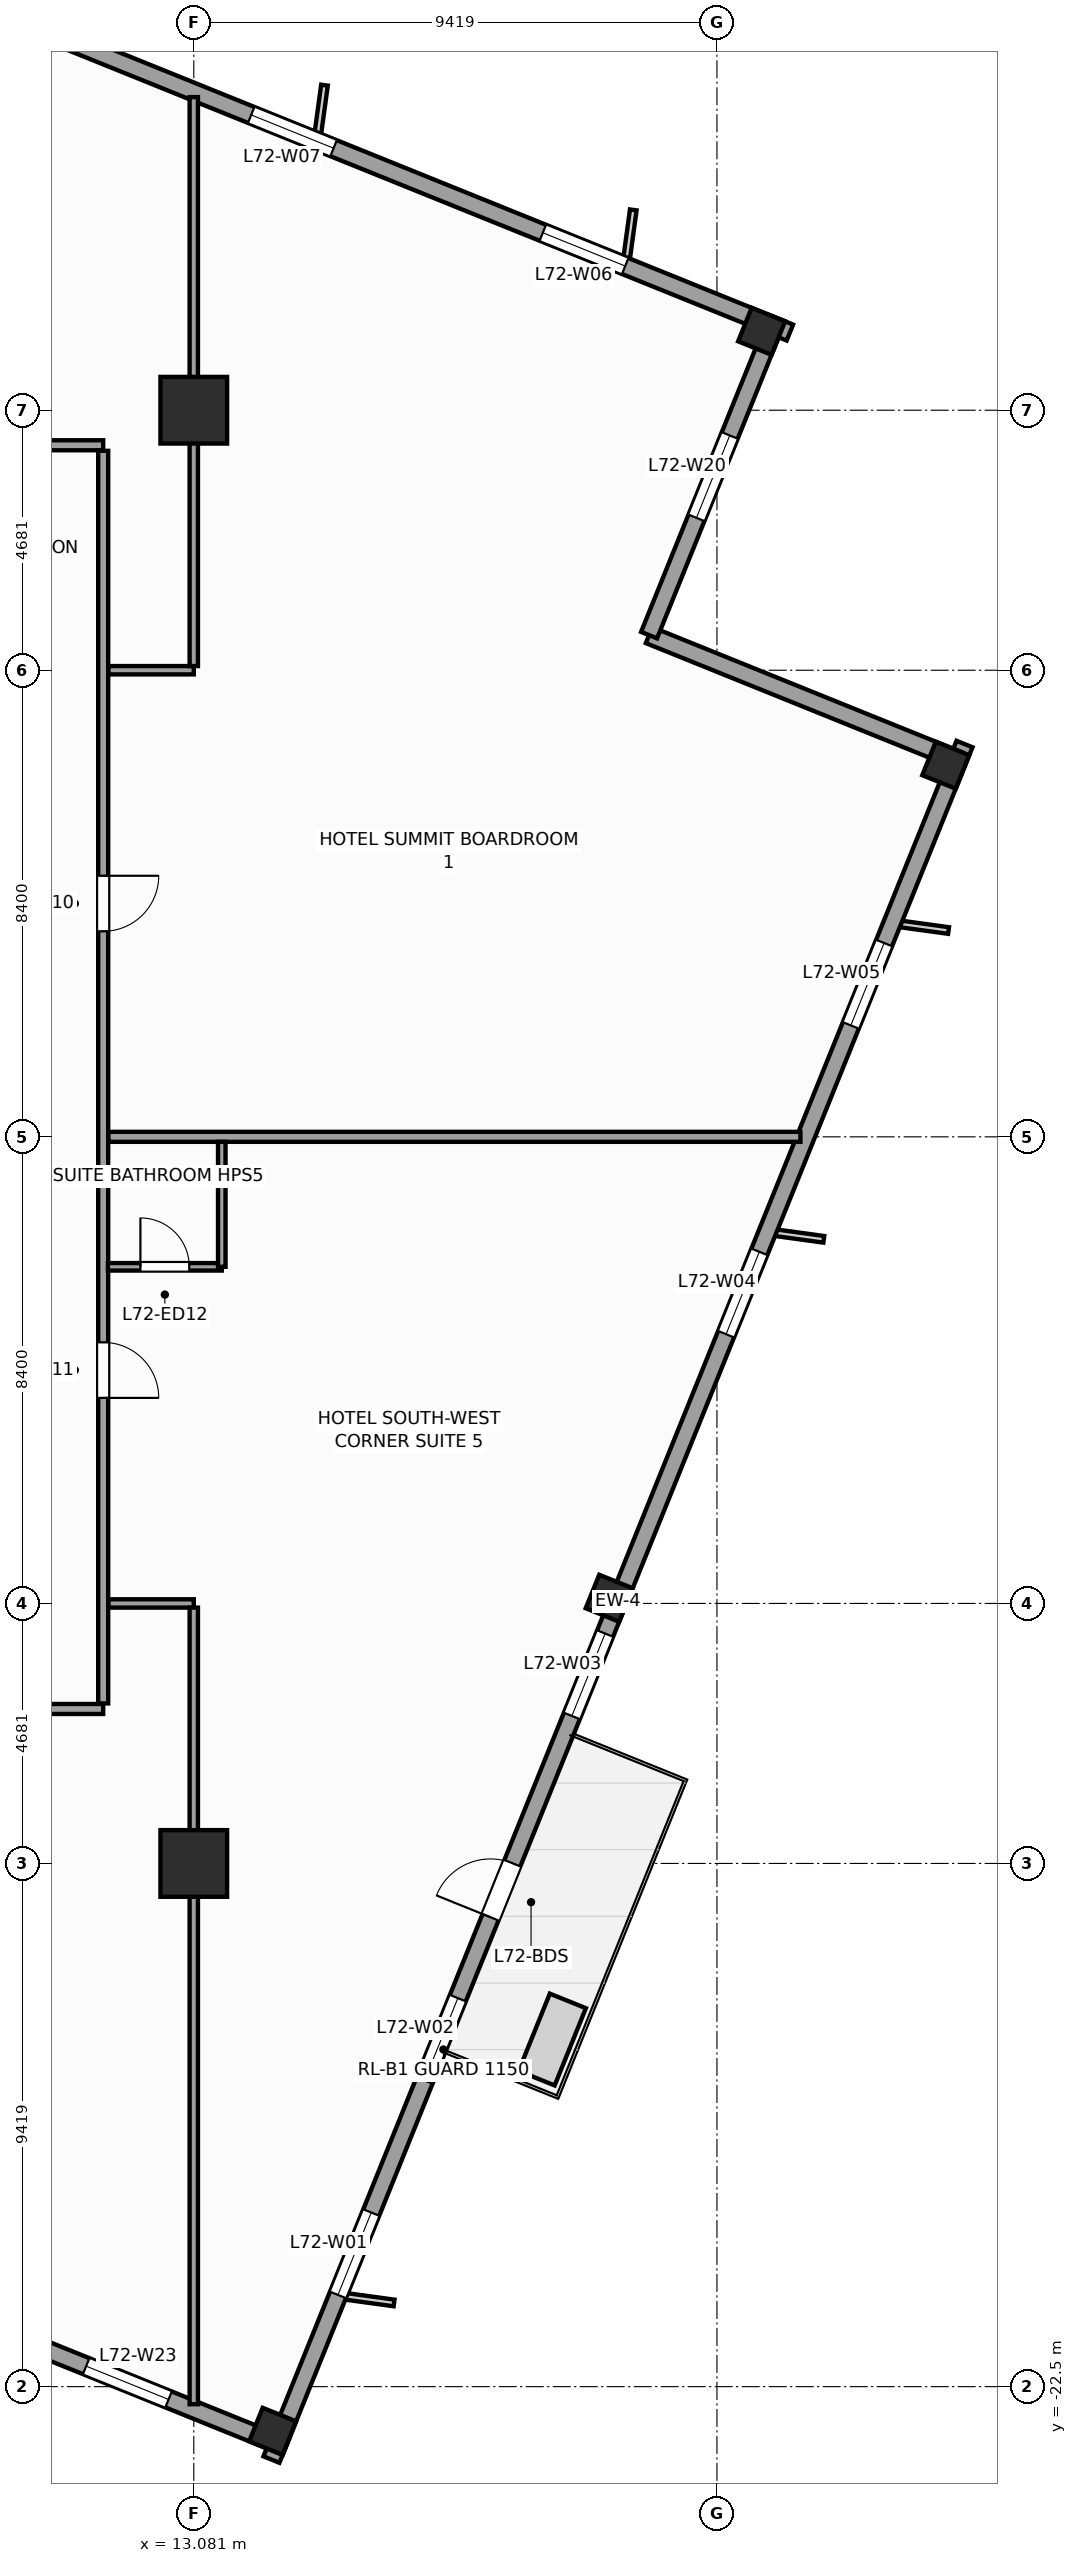
"""IFC4 building model, lengths in metres.
Left out: names, types, materials, properties, quantities, classifications, styles, units other than length and angle.
Written with IfcOpenShell. Run it as: python <this file> out.ifc"""

import sys

from ifc_helpers import new_model, si_unit, direction, frame, frame_2d, origin, origin_2d, place, context, subcontext, project, spatial, rectangle, extrude, source, transform, mapped, element, fill, save


model = new_model("IFC4")
c1 = context("Model", 3, precision=1e-05, world=origin(), true_north=direction((0.0, 1.0)))
c2 = subcontext(c1, "Body", "Model", "MODEL_VIEW")
j1 = project(units=[si_unit("LENGTHUNIT", "METRE"), si_unit("PLANEANGLEUNIT", "RADIAN")], contexts=[c1])
p1 = place(None, origin())
s1 = spatial("IfcSite", under=j1, at=p1, CompositionType="ELEMENT")
p2 = place(p1, origin())
s2 = spatial("IfcBuilding", under=s1, at=p2, CompositionType="ELEMENT")
p3 = place(p2, frame((0.0, 0.0, 294.0)))
s3 = spatial("IfcBuildingStorey", under=s2, at=p3, CompositionType="ELEMENT", Elevation=294.0)
m1 = source(origin(), c2, "Body", "SweptSolid", [
    extrude(rectangle(XDim=1.2, YDim=1.2, at=origin_2d()), origin(), (0.0, 0.0, 1.0), 3.6),
])
for number, where, z_axis, x_axis in (
    (1, (13.081, -13.081, 0.0), (0.0, 0.0, 1.0), (1.0, 0.0, 0.0)),
    (2, (13.081, 13.081, 0.0), (0.0, 0.0, 1.0), (1.0, 0.0, 0.0)),
):
    element("IfcColumn", number, at=place(p3, frame(where, z_axis=z_axis, x_axis=x_axis)), inside=s3, PredefinedType="COLUMN", context=c2, shape_type="MappedRepresentation", body=[
        mapped(m1, transform((0.0, 0.0, 0.0), scale=1.0)),
    ])
m2 = source(origin(), c2, "Body", "SweptSolid", [
    extrude(rectangle(XDim=0.65, YDim=0.65, at=origin_2d()), origin(), (0.0, 0.0, 1.0), 3.6),
])
for number, where, z_axis, x_axis in (
    (3, (14.501, -23.304, 0.0), (0.0, 0.0, 1.0), (0.375, 0.927, 0.0)),
    (4, (20.56, -8.307, 0.0), (0.0, 0.0, 1.0), (0.375, 0.927, 0.0)),
    (5, (26.62, 6.69, 0.0), (0.0, 0.0, 1.0), (0.375, 0.927, 0.0)),
    (6, (23.304, 14.501, 0.0), (0.0, 0.0, 1.0), (0.375, 0.927, 0.0)),
):
    element("IfcColumn", number, at=place(p3, frame(where, z_axis=z_axis, x_axis=x_axis)), inside=s3, PredefinedType="COLUMN", context=c2, shape_type="MappedRepresentation", body=[
        mapped(m2, transform((0.0, 0.0, 0.0), scale=1.0)),
    ])
p4 = place(p3, frame((14.479, -23.813, 0.0), z_axis=(0.0, 0.0, 1.0), x_axis=(0.374609557019, 0.927182657188, 0.0)))
e7 = element("IfcWall", 7, at=p4, inside=s3, PredefinedType="STANDARD", context=c2, shape_type="SweptSolid", body=[
    extrude(rectangle(XDim=33.31, YDim=0.31, at=frame_2d((16.655, 0.0))), origin(), (0.0, 0.0, 1.0), 2.75),
])
p5 = place(p4, frame((10.53, 0.0, 0.0)))
e8 = element("IfcOpeningElement", 8, at=p5, cuts=e7, PredefinedType="OPENING", context=c2, shape_type="SweptSolid", body=[
    extrude(rectangle(XDim=1.05, YDim=2.25, at=frame_2d((0.525, 1.125))), frame((0.0, 0.165, 0.0), z_axis=(0.0, -1.0, 0.0), x_axis=(1.0, 0.0, 0.0)), (0.0, 0.0, 1.0), 0.33),
])
p6 = place(p4, frame((3.197, 0.0, 0.47)))
e9 = element("IfcOpeningElement", 9, at=p6, cuts=e7, PredefinedType="OPENING", context=c2, shape_type="SweptSolid", body=[
    extrude(rectangle(XDim=1.6, YDim=2.1, at=frame_2d((0.8, 1.05))), frame((0.0, 0.165, 0.0), z_axis=(0.0, -1.0, 0.0), x_axis=(1.0, 0.0, 0.0)), (0.0, 0.0, 1.0), 0.33),
])
p7 = place(p4, frame((7.36, 0.0, 0.47)))
e10 = element("IfcOpeningElement", 10, at=p7, cuts=e7, PredefinedType="OPENING", context=c2, shape_type="SweptSolid", body=[
    extrude(rectangle(XDim=1.6, YDim=2.1, at=frame_2d((0.8, 1.05))), frame((0.0, 0.165, 0.0), z_axis=(0.0, -1.0, 0.0), x_axis=(1.0, 0.0, 0.0)), (0.0, 0.0, 1.0), 0.33),
])
p8 = place(p4, frame((14.439, 0.0, 0.47)))
e11 = element("IfcOpeningElement", 11, at=p8, cuts=e7, PredefinedType="OPENING", context=c2, shape_type="SweptSolid", body=[
    extrude(rectangle(XDim=1.6, YDim=2.1, at=frame_2d((0.8, 1.05))), frame((0.0, 0.165, 0.0), z_axis=(0.0, -1.0, 0.0), x_axis=(1.0, 0.0, 0.0)), (0.0, 0.0, 1.0), 0.33),
])
p9 = place(p4, frame((21.851, 0.0, 0.47)))
e12 = element("IfcOpeningElement", 12, at=p9, cuts=e7, PredefinedType="OPENING", context=c2, shape_type="SweptSolid", body=[
    extrude(rectangle(XDim=1.6, YDim=2.1, at=frame_2d((0.8, 1.05))), frame((0.0, 0.165, 0.0), z_axis=(0.0, -1.0, 0.0), x_axis=(1.0, 0.0, 0.0)), (0.0, 0.0, 1.0), 0.33),
])
p10 = place(p4, frame((27.847, 0.0, 0.47)))
e13 = element("IfcOpeningElement", 13, at=p10, cuts=e7, PredefinedType="OPENING", context=c2, shape_type="SweptSolid", body=[
    extrude(rectangle(XDim=1.6, YDim=2.1, at=frame_2d((0.8, 1.05))), frame((0.0, 0.165, 0.0), z_axis=(0.0, -1.0, 0.0), x_axis=(1.0, 0.0, 0.0)), (0.0, 0.0, 1.0), 0.33),
])
p11 = place(p3, frame((26.841, 6.784, 0.0), z_axis=(0.0, 0.0, 1.0), x_axis=(-0.927171722085, 0.374636620962, 0.0)))
e14 = element("IfcWall", 14, at=p11, inside=s3, PredefinedType="STANDARD", context=c2, shape_type="SweptSolid", body=[
    extrude(rectangle(XDim=6.0, YDim=0.31, at=frame_2d((3.0, 0.0))), origin(), (0.0, 0.0, 1.0), 2.65),
])
p12 = place(p3, frame((21.278, 9.032, 0.0), z_axis=(0.0, 0.0, 1.0), x_axis=(0.374602739196, 0.927185411764, 0.0)))
e15 = element("IfcWall", 15, at=p12, inside=s3, PredefinedType="STANDARD", context=c2, shape_type="SweptSolid", body=[
    extrude(rectangle(XDim=6.155, YDim=0.31, at=frame_2d((3.078, 0.0))), origin(), (0.0, 0.0, 1.0), 3.35),
])
p13 = place(p12, frame((2.278, 0.0, 0.47)))
e16 = element("IfcOpeningElement", 16, at=p13, cuts=e15, PredefinedType="OPENING", context=c2, shape_type="SweptSolid", body=[
    extrude(rectangle(XDim=1.6, YDim=2.1, at=frame_2d((0.8, 1.05))), frame((0.0, 0.165, 0.0), z_axis=(0.0, -1.0, 0.0), x_axis=(1.0, 0.0, 0.0)), (0.0, 0.0, 1.0), 0.33),
])
p14 = place(p3, frame((23.813, 14.479, 0.0), z_axis=(0.0, 0.0, 1.0), x_axis=(-0.927182657188, 0.374609557019, 0.0)))
e17 = element("IfcWall", 17, at=p14, inside=s3, PredefinedType="STANDARD", context=c2, shape_type="SweptSolid", body=[
    extrude(rectangle(XDim=33.31, YDim=0.31, at=frame_2d((16.655, 0.0))), origin(), (0.0, 0.0, 1.0), 2.75),
])
p15 = place(p14, frame((3.197, 0.0, 0.47)))
e18 = element("IfcOpeningElement", 18, at=p15, cuts=e17, PredefinedType="OPENING", context=c2, shape_type="SweptSolid", body=[
    extrude(rectangle(XDim=1.6, YDim=2.1, at=frame_2d((0.8, 1.05))), frame((0.0, 0.165, 0.0), z_axis=(0.0, -1.0, 0.0), x_axis=(1.0, 0.0, 0.0)), (0.0, 0.0, 1.0), 0.33),
])
p16 = place(p14, frame((8.86, 0.0, 0.47)))
e19 = element("IfcOpeningElement", 19, at=p16, cuts=e17, PredefinedType="OPENING", context=c2, shape_type="SweptSolid", body=[
    extrude(rectangle(XDim=1.6, YDim=2.1, at=frame_2d((0.8, 1.05))), frame((0.0, 0.165, 0.0), z_axis=(0.0, -1.0, 0.0), x_axis=(1.0, 0.0, 0.0)), (0.0, 0.0, 1.0), 0.33),
])
p17 = place(p14, frame((14.439, 0.0, 0.47)))
e20 = element("IfcOpeningElement", 20, at=p17, cuts=e17, PredefinedType="OPENING", context=c2, shape_type="SweptSolid", body=[
    extrude(rectangle(XDim=1.6, YDim=2.1, at=frame_2d((0.8, 1.05))), frame((0.0, 0.165, 0.0), z_axis=(0.0, -1.0, 0.0), x_axis=(1.0, 0.0, 0.0)), (0.0, 0.0, 1.0), 0.33),
])
p18 = place(p14, frame((27.847, 0.0, 0.47)))
e21 = element("IfcOpeningElement", 21, at=p18, cuts=e17, PredefinedType="OPENING", context=c2, shape_type="SweptSolid", body=[
    extrude(rectangle(XDim=1.6, YDim=2.1, at=frame_2d((0.8, 1.05))), frame((0.0, 0.165, 0.0), z_axis=(0.0, -1.0, 0.0), x_axis=(1.0, 0.0, 0.0)), (0.0, 0.0, 1.0), 0.33),
])
p19 = place(p3, frame((9.032, -21.278, 0.0), z_axis=(0.0, 0.0, 1.0), x_axis=(0.927185411764, -0.374602739196, 0.0)))
e22 = element("IfcWall", 22, at=p19, inside=s3, PredefinedType="STANDARD", context=c2, shape_type="SweptSolid", body=[
    extrude(rectangle(XDim=6.155, YDim=0.31, at=frame_2d((3.078, 0.0))), origin(), (0.0, 0.0, 1.0), 3.35),
])
p20 = place(p19, frame((2.278, 0.0, 0.47)))
e23 = element("IfcOpeningElement", 23, at=p20, cuts=e22, PredefinedType="OPENING", context=c2, shape_type="SweptSolid", body=[
    extrude(rectangle(XDim=1.6, YDim=2.1, at=frame_2d((0.8, 1.05))), frame((0.0, 0.165, 0.0), z_axis=(0.0, -1.0, 0.0), x_axis=(1.0, 0.0, 0.0)), (0.0, 0.0, 1.0), 0.33),
])
p21 = place(p3, frame((-11.35, -10.3, 0.0), z_axis=(0.0, 0.0, 1.0), x_axis=(1.0, 0.0, 0.0)))
e24 = element("IfcWall", 24, at=p21, inside=s3, PredefinedType="PARTITIONING", context=c2, shape_type="SweptSolid", body=[
    extrude(rectangle(XDim=22.8, YDim=0.18, at=frame_2d((11.4, 0.0))), origin(), (0.0, 0.0, 1.0), 3.35),
])
p22 = place(p21, frame((12.336, 0.0, 0.0)))
e25 = element("IfcOpeningElement", 25, at=p22, cuts=e24, PredefinedType="OPENING", context=c2, shape_type="SweptSolid", body=[
    extrude(rectangle(XDim=0.95, YDim=2.1, at=frame_2d((0.475, 1.05))), frame((0.0, 0.1, 0.0), z_axis=(0.0, -1.0, 0.0), x_axis=(1.0, 0.0, 0.0)), (0.0, 0.0, 1.0), 0.2),
])
p23 = place(p21, frame((17.71, 0.0, 0.0)))
e26 = element("IfcOpeningElement", 26, at=p23, cuts=e24, PredefinedType="OPENING", context=c2, shape_type="SweptSolid", body=[
    extrude(rectangle(XDim=1.0, YDim=2.15, at=frame_2d((0.5, 1.075))), frame((0.0, 0.1, 0.0), z_axis=(0.0, -1.0, 0.0), x_axis=(1.0, 0.0, 0.0)), (0.0, 0.0, 1.0), 0.2),
])
p24 = place(p21, frame((5.339, 0.0, 0.0)))
e27 = element("IfcOpeningElement", 27, at=p24, cuts=e24, PredefinedType="OPENING", context=c2, shape_type="SweptSolid", body=[
    extrude(rectangle(XDim=1.0, YDim=2.15, at=frame_2d((0.5, 1.075))), frame((0.0, 0.1, 0.0), z_axis=(0.0, -1.0, 0.0), x_axis=(1.0, 0.0, 0.0)), (0.0, 0.0, 1.0), 0.2),
])
p25 = place(p3, frame((-11.35, 12.45, 0.0), z_axis=(0.0, 0.0, 1.0), x_axis=(1.0, 0.0, 0.0)))
e28 = element("IfcWall", 28, at=p25, inside=s3, PredefinedType="PARTITIONING", context=c2, shape_type="SweptSolid", body=[
    extrude(rectangle(XDim=22.8, YDim=0.18, at=frame_2d((11.4, 0.0))), origin(), (0.0, 0.0, 1.0), 3.35),
])
p26 = place(p25, frame((6.089, 0.0, 0.0)))
e29 = element("IfcOpeningElement", 29, at=p26, cuts=e28, PredefinedType="OPENING", context=c2, shape_type="SweptSolid", body=[
    extrude(rectangle(XDim=1.0, YDim=2.15, at=frame_2d((0.5, 1.075))), frame((0.0, 0.1, 0.0), z_axis=(0.0, -1.0, 0.0), x_axis=(1.0, 0.0, 0.0)), (0.0, 0.0, 1.0), 0.2),
])
p27 = place(p25, frame((17.161, 0.0, 0.0)))
e30 = element("IfcOpeningElement", 30, at=p27, cuts=e28, PredefinedType="OPENING", context=c2, shape_type="SweptSolid", body=[
    extrude(rectangle(XDim=1.0, YDim=2.15, at=frame_2d((0.5, 1.075))), frame((0.0, 0.1, 0.0), z_axis=(0.0, -1.0, 0.0), x_axis=(1.0, 0.0, 0.0)), (0.0, 0.0, 1.0), 0.2),
])
p28 = place(p3, frame((11.45, -10.2, 0.0), z_axis=(0.0, 0.0, 1.0), x_axis=(0.0, 1.0, 0.0)))
e31 = element("IfcWall", 31, at=p28, inside=s3, PredefinedType="PARTITIONING", context=c2, shape_type="SweptSolid", body=[
    extrude(rectangle(XDim=22.55, YDim=0.18, at=frame_2d((11.275, 0.0))), origin(), (0.0, 0.0, 1.0), 3.35),
])
p29 = place(p28, frame((13.9, 0.0, 0.0)))
e32 = element("IfcOpeningElement", 32, at=p29, cuts=e31, PredefinedType="OPENING", context=c2, shape_type="SweptSolid", body=[
    extrude(rectangle(XDim=1.0, YDim=2.15, at=frame_2d((0.5, 1.075))), frame((0.0, 0.1, 0.0), z_axis=(0.0, -1.0, 0.0), x_axis=(1.0, 0.0, 0.0)), (0.0, 0.0, 1.0), 0.2),
])
p30 = place(p28, frame((5.5, 0.0, 0.0)))
e33 = element("IfcOpeningElement", 33, at=p30, cuts=e31, PredefinedType="OPENING", context=c2, shape_type="SweptSolid", body=[
    extrude(rectangle(XDim=1.0, YDim=2.15, at=frame_2d((0.5, 1.075))), frame((0.0, 0.1, 0.0), z_axis=(0.0, -1.0, 0.0), x_axis=(1.0, 0.0, 0.0)), (0.0, 0.0, 1.0), 0.2),
])
p31 = place(p3, frame((11.545, 0.0, 0.0), z_axis=(0.0, 0.0, 1.0), x_axis=(1.0, 0.0, 0.0)))
e34 = element("IfcWall", 34, at=p31, inside=s3, PredefinedType="PARTITIONING", context=c2, shape_type="SweptSolid", body=[
    extrude(rectangle(XDim=12.458, YDim=0.18, at=frame_2d((6.229, 0.0))), origin(), (0.0, 0.0, 1.0), 3.35),
])
p32 = place(p3, frame((11.545, 8.4, 0.0), z_axis=(0.0, 0.0, 1.0), x_axis=(1.0, 0.0, 0.0)))
e35 = element("IfcWall", 35, at=p32, inside=s3, PredefinedType="PARTITIONING", context=c2, shape_type="SweptSolid", body=[
    extrude(rectangle(XDim=1.536, YDim=0.15, at=frame_2d((0.768, 0.0))), origin(), (0.0, 0.0, 1.0), 3.35),
])
p33 = place(p3, frame((13.081, 8.475, 0.0), z_axis=(0.0, 0.0, 1.0), x_axis=(0.0, 1.0, 0.0)))
e36 = element("IfcWall", 36, at=p33, inside=s3, PredefinedType="PARTITIONING", context=c2, shape_type="SweptSolid", body=[
    extrude(rectangle(XDim=10.243, YDim=0.15, at=frame_2d((5.121, 0.0))), origin(), (0.0, 0.0, 1.0), 2.45),
])
p34 = place(p3, frame((11.545, -8.4, 0.0), z_axis=(0.0, 0.0, 1.0), x_axis=(1.0, 0.0, 0.0)))
e37 = element("IfcWall", 37, at=p34, inside=s3, PredefinedType="PARTITIONING", context=c2, shape_type="SweptSolid", body=[
    extrude(rectangle(XDim=1.536, YDim=0.15, at=frame_2d((0.768, 0.0))), origin(), (0.0, 0.0, 1.0), 3.35),
])
p35 = place(p3, frame((13.081, -8.475, 0.0), z_axis=(0.0, 0.0, 1.0), x_axis=(0.0, -1.0, 0.0)))
e38 = element("IfcWall", 38, at=p35, inside=s3, PredefinedType="PARTITIONING", context=c2, shape_type="SweptSolid", body=[
    extrude(rectangle(XDim=14.342, YDim=0.15, at=frame_2d((7.171, 0.0))), origin(), (0.0, 0.0, 1.0), 2.45),
])
p36 = place(p3, frame((11.535, -2.34, 0.0), z_axis=(0.0, 0.0, 1.0), x_axis=(1.0, 0.0, 0.0)))
e39 = element("IfcWall", 39, at=p36, inside=s3, PredefinedType="PARTITIONING", context=c2, shape_type="SweptSolid", body=[
    extrude(rectangle(XDim=2.05, YDim=0.135, at=frame_2d((1.025, 0.0))), origin(), (0.0, 0.0, 1.0), 3.35),
])
p37 = place(p36, frame((0.585, 0.0, 0.0)))
e40 = element("IfcOpeningElement", 40, at=p37, cuts=e39, PredefinedType="OPENING", context=c2, shape_type="SweptSolid", body=[
    extrude(rectangle(XDim=0.88, YDim=2.1, at=frame_2d((0.44, 1.05))), frame((0.0, 0.078, 0.0), z_axis=(0.0, -1.0, 0.0), x_axis=(1.0, 0.0, 0.0)), (0.0, 0.0, 1.0), 0.155),
])
p38 = place(p3, frame((13.585, -2.34, 0.0), z_axis=(0.0, 0.0, 1.0), x_axis=(0.0, 1.0, 0.0)))
e41 = element("IfcWall", 41, at=p38, inside=s3, PredefinedType="PARTITIONING", context=c2, shape_type="SweptSolid", body=[
    extrude(rectangle(XDim=2.25, YDim=0.135, at=frame_2d((1.125, 0.0))), origin(), (0.0, 0.0, 1.0), 3.35),
])
m3 = source(origin(), c2, "Body", "SweptSolid", [
    extrude(rectangle(XDim=1.05, YDim=2.25, at=frame_2d((0.525, 1.125))), frame((0.0, 0.025, 0.0), z_axis=(0.0, -1.0, 0.0), x_axis=(1.0, 0.0, 0.0)), (0.0, 0.0, 1.0), 0.05),
])
p39 = place(p5, origin())
e42 = element("IfcDoor", 42, at=p39, inside=s3, OperationType="SINGLE_SWING_LEFT", PredefinedType="DOOR", context=c2, shape_type="MappedRepresentation", body=[
    mapped(m3, transform((0.0, 0.0, 0.0), scale=1.0)),
])
fill(e8, e42)
m4 = source(origin(), c2, "Body", "SweptSolid", [
    extrude(rectangle(XDim=1.6, YDim=2.1, at=frame_2d((0.8, 1.05))), frame((0.0, 0.03, 0.0), z_axis=(0.0, -1.0, 0.0), x_axis=(1.0, 0.0, 0.0)), (0.0, 0.0, 1.0), 0.06),
])
p40 = place(p6, origin())
e43 = element("IfcWindow", 43, at=p40, inside=s3, PartitioningType="SINGLE_PANEL", PredefinedType="WINDOW", context=c2, shape_type="MappedRepresentation", body=[
    mapped(m4, transform((0.0, 0.0, 0.0), scale=1.0)),
])
fill(e9, e43)
p41 = place(p7, origin())
e44 = element("IfcWindow", 44, at=p41, inside=s3, PartitioningType="SINGLE_PANEL", PredefinedType="WINDOW", context=c2, shape_type="MappedRepresentation", body=[
    mapped(m4, transform((0.0, 0.0, 0.0), scale=1.0)),
])
fill(e10, e44)
p42 = place(p8, origin())
e45 = element("IfcWindow", 45, at=p42, inside=s3, PartitioningType="SINGLE_PANEL", PredefinedType="WINDOW", context=c2, shape_type="MappedRepresentation", body=[
    mapped(m4, transform((0.0, 0.0, 0.0), scale=1.0)),
])
fill(e11, e45)
p43 = place(p9, origin())
e46 = element("IfcWindow", 46, at=p43, inside=s3, PartitioningType="SINGLE_PANEL", PredefinedType="WINDOW", context=c2, shape_type="MappedRepresentation", body=[
    mapped(m4, transform((0.0, 0.0, 0.0), scale=1.0)),
])
fill(e12, e46)
p44 = place(p10, origin())
e47 = element("IfcWindow", 47, at=p44, inside=s3, PartitioningType="SINGLE_PANEL", PredefinedType="WINDOW", context=c2, shape_type="MappedRepresentation", body=[
    mapped(m4, transform((0.0, 0.0, 0.0), scale=1.0)),
])
fill(e13, e47)
p45 = place(p15, origin())
e48 = element("IfcWindow", 48, at=p45, inside=s3, PartitioningType="SINGLE_PANEL", PredefinedType="WINDOW", context=c2, shape_type="MappedRepresentation", body=[
    mapped(m4, transform((0.0, 0.0, 0.0), scale=1.0)),
])
fill(e18, e48)
p46 = place(p16, origin())
e49 = element("IfcWindow", 49, at=p46, inside=s3, PartitioningType="SINGLE_PANEL", PredefinedType="WINDOW", context=c2, shape_type="MappedRepresentation", body=[
    mapped(m4, transform((0.0, 0.0, 0.0), scale=1.0)),
])
fill(e19, e49)
p47 = place(p13, origin())
e50 = element("IfcWindow", 50, at=p47, inside=s3, PartitioningType="SINGLE_PANEL", PredefinedType="WINDOW", context=c2, shape_type="MappedRepresentation", body=[
    mapped(m4, transform((0.0, 0.0, 0.0), scale=1.0)),
])
fill(e16, e50)
p48 = place(p20, origin())
e51 = element("IfcWindow", 51, at=p48, inside=s3, PartitioningType="SINGLE_PANEL", PredefinedType="WINDOW", context=c2, shape_type="MappedRepresentation", body=[
    mapped(m4, transform((0.0, 0.0, 0.0), scale=1.0)),
])
fill(e23, e51)
m5 = source(origin(), c2, "Body", "SweptSolid", [
    extrude(rectangle(XDim=1.0, YDim=2.15, at=frame_2d((0.5, 1.075))), frame((0.0, 0.025, 0.0), z_axis=(0.0, -1.0, 0.0), x_axis=(1.0, 0.0, 0.0)), (0.0, 0.0, 1.0), 0.05),
])
p49 = place(p29, frame((1.0, 0.0, 0.0), z_axis=(0.0, 0.0, 1.0), x_axis=(-1.0, 0.0, 0.0)))
e52 = element("IfcDoor", 52, at=p49, inside=s3, OperationType="SINGLE_SWING_RIGHT", PredefinedType="DOOR", context=c2, shape_type="MappedRepresentation", body=[
    mapped(m5, transform((0.0, 0.0, 0.0), scale=1.0)),
])
fill(e32, e52)
p50 = place(p30, frame((1.0, 0.0, 0.0), z_axis=(0.0, 0.0, 1.0), x_axis=(-1.0, 0.0, 0.0)))
e53 = element("IfcDoor", 53, at=p50, inside=s3, OperationType="SINGLE_SWING_LEFT", PredefinedType="DOOR", context=c2, shape_type="MappedRepresentation", body=[
    mapped(m5, transform((0.0, 0.0, 0.0), scale=1.0)),
])
fill(e33, e53)
m6 = source(origin(), c2, "Body", "SweptSolid", [
    extrude(rectangle(XDim=0.88, YDim=2.1, at=frame_2d((0.44, 1.05))), frame((0.0, 0.025, 0.0), z_axis=(0.0, -1.0, 0.0), x_axis=(1.0, 0.0, 0.0)), (0.0, 0.0, 1.0), 0.05),
])
p51 = place(p37, origin())
e54 = element("IfcDoor", 54, at=p51, inside=s3, OperationType="SINGLE_SWING_LEFT", PredefinedType="DOOR", context=c2, shape_type="MappedRepresentation", body=[
    mapped(m6, transform((0.0, 0.0, 0.0), scale=1.0)),
])
fill(e40, e54)
save(model, sys.argv[1])
